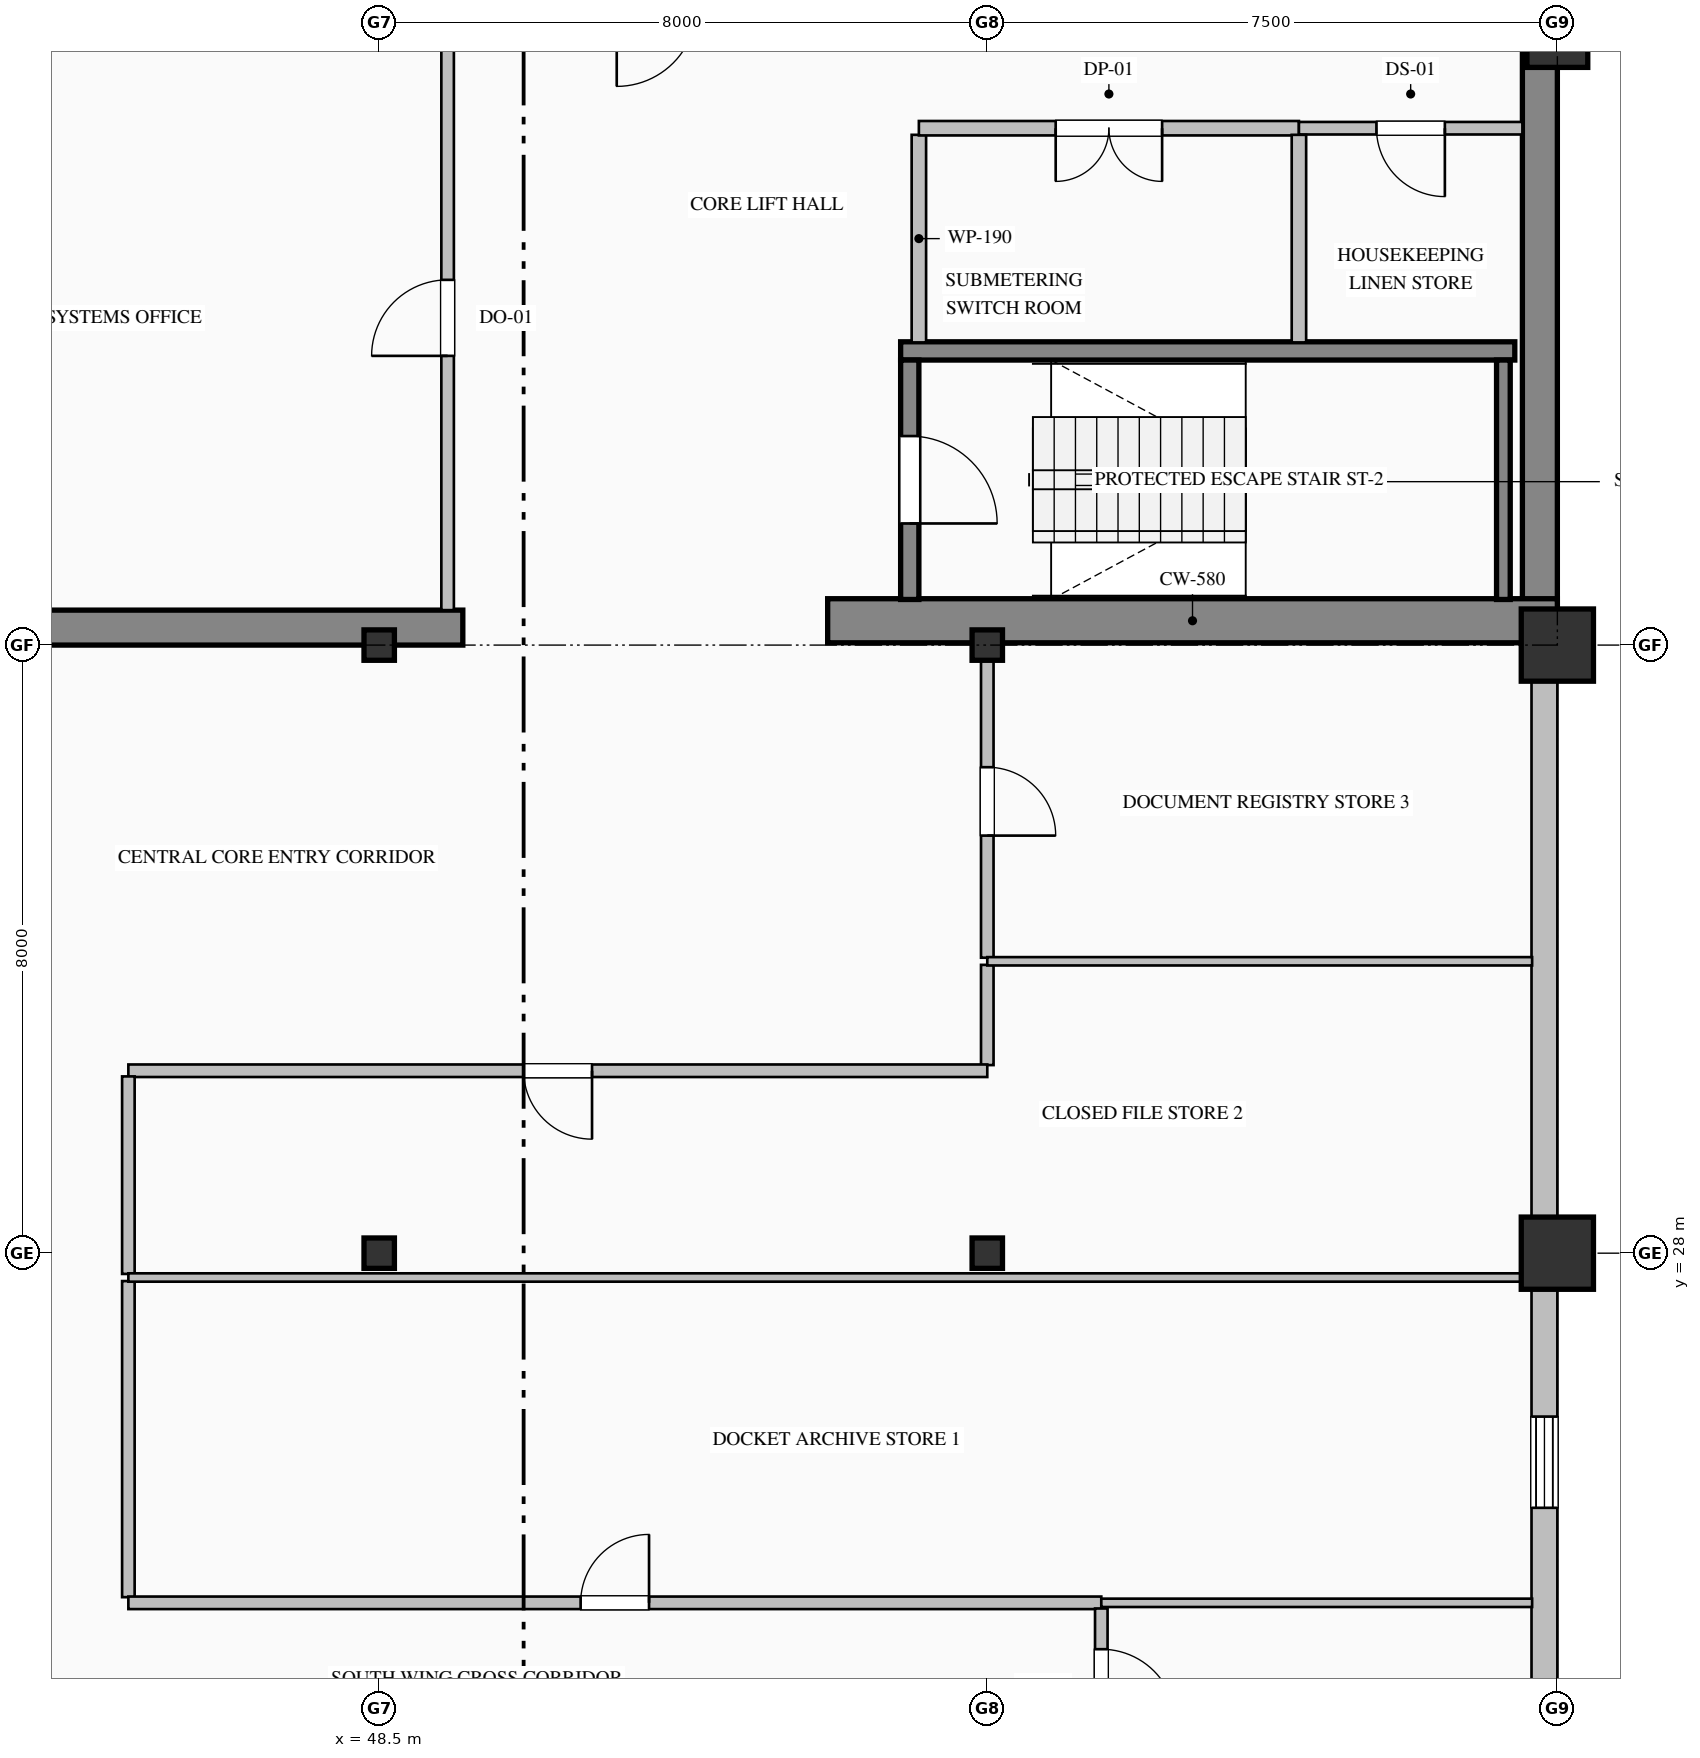
"""IFC4 building model, lengths in metres.
Left out: names, types, materials, properties, quantities, classifications, styles, units other than length and angle.
Written with IfcOpenShell. Run it as: python <this file> out.ifc"""

import sys

from ifc_helpers import new_model, si_unit, direction, frame, frame_2d, origin, origin_2d, place, context, subcontext, project, spatial, rectangle, hollow_rectangle, i_section, extrude, element, fill, save


model = new_model("IFC4")
c1 = context("Model", 3, precision=1e-05, world=origin(), true_north=direction((0.0, 1.0)))
c2 = subcontext(c1, "Body", "Model", "MODEL_VIEW")
j1 = project(units=[si_unit("LENGTHUNIT", "METRE"), si_unit("PLANEANGLEUNIT", "RADIAN")], contexts=[c1])
p1 = place(None, origin())
s1 = spatial("IfcSite", under=j1, at=p1, CompositionType="ELEMENT")
p2 = place(p1, origin())
s2 = spatial("IfcBuilding", under=s1, at=p2, CompositionType="ELEMENT")
p3 = place(p2, frame((0.0, 0.0, 277.8)))
s3 = spatial("IfcBuildingStorey", under=s2, at=p3, CompositionType="ELEMENT", Elevation=277.8)
p4 = place(p3, frame((63.77, 36.32, 0.0), z_axis=(0.0, 0.0, 1.0), x_axis=(0.0, 1.0, 0.0)))
e1 = element("IfcWall", 1, at=p4, inside=s3, PredefinedType="SHEAR", context=c2, shape_type="SweptSolid", body=[
    extrude(rectangle(XDim=15.22, YDim=0.46, at=frame_2d((7.61, 0.0))), origin(), (0.0, 0.0, 1.0), 3.65),
])
p5 = place(p3, frame((40.5, 36.23, 0.0), z_axis=(0.0, 0.0, 1.0), x_axis=(1.0, 0.0, 0.0)))
e2 = element("IfcWall", 2, at=p5, inside=s3, PredefinedType="SHEAR", context=c2, shape_type="SweptSolid", body=[
    extrude(rectangle(XDim=9.1, YDim=0.46, at=frame_2d((4.55, 0.0))), origin(), (0.0, 0.0, 1.0), 3.65),
])
p6 = place(p3, frame((54.4, 36.32, 0.0), z_axis=(0.0, 0.0, 1.0), x_axis=(1.0, 0.0, 0.0)))
e3 = element("IfcWall", 3, at=p6, inside=s3, PredefinedType="SHEAR", context=c2, shape_type="SweptSolid", body=[
    extrude(rectangle(XDim=9.6, YDim=0.58, at=frame_2d((4.8, 0.0))), origin(), (0.0, 0.0, 1.0), 4.0),
])
for number, where, z_axis, x_axis in (
    (4, (48.5, 28.0, 0.0), (0.0, 0.0, 1.0), (1.0, 0.0, 0.0)),
    (5, (48.5, 36.0, 0.0), (0.0, 0.0, 1.0), (1.0, 0.0, 0.0)),
    (6, (56.5, 28.0, 0.0), (0.0, 0.0, 1.0), (1.0, 0.0, 0.0)),
    (7, (56.5, 36.0, 0.0), (0.0, 0.0, 1.0), (1.0, 0.0, 0.0)),
):
    element("IfcColumn", number, at=place(p3, frame(where, z_axis=z_axis, x_axis=x_axis)), inside=s3, PredefinedType="COLUMN", context=c2, shape_type="SweptSolid", body=[
        extrude(i_section(OverallWidth=0.4, OverallDepth=0.4, WebThickness=0.013, FlangeThickness=0.021, FilletRadius=0.022, at=origin_2d()), origin(), (0.0, 0.0, 1.0), 4.0),
    ])
for number, where, z_axis, x_axis in (
    (8, (64.0, 28.0, 0.0), (0.0, 0.0, 1.0), (1.0, 0.0, 0.0)),
    (9, (64.0, 36.0, 0.0), (0.0, 0.0, 1.0), (1.0, 0.0, 0.0)),
):
    element("IfcColumn", number, at=place(p3, frame(where, z_axis=z_axis, x_axis=x_axis)), inside=s3, PredefinedType="COLUMN", context=c2, shape_type="SweptSolid", body=[
        extrude(hollow_rectangle(XDim=0.95, YDim=0.95, WallThickness=0.036, at=origin_2d()), origin(), (0.0, 0.0, 1.0), 4.0),
    ])
p7 = place(p3, frame((64.0, 44.0, 0.0), z_axis=(0.0, 0.0, 1.0), x_axis=(1.0, 0.0, 0.0)))
e10 = element("IfcColumn", 10, at=p7, inside=s3, PredefinedType="COLUMN", context=c2, shape_type="SweptSolid", body=[
    extrude(hollow_rectangle(XDim=0.8, YDim=0.8, WallThickness=0.032, at=origin_2d()), origin(), (0.0, 0.0, 1.0), 4.0),
])
p8 = place(p3, frame((63.83, 36.05, 0.0), z_axis=(0.0, 0.0, 1.0), x_axis=(0.0, -1.0, 0.0)))
e11 = element("IfcWall", 11, at=p8, inside=s3, PredefinedType="SOLIDWALL", context=c2, shape_type="SweptSolid", body=[
    extrude(rectangle(XDim=19.55, YDim=0.34, at=frame_2d((9.775, 0.0))), origin(), (0.0, 0.0, 1.0), 3.2),
])
p9 = place(p8, frame((10.2, 0.0, 0.9)))
e12 = element("IfcOpeningElement", 12, at=p9, cuts=e11, PredefinedType="OPENING", context=c2, shape_type="SweptSolid", body=[
    extrude(rectangle(XDim=1.2, YDim=1.85, at=frame_2d((0.6, 0.925))), frame((0.0, 0.18, 0.0), z_axis=(0.0, -1.0, 0.0), x_axis=(1.0, 0.0, 0.0)), (0.0, 0.0, 1.0), 0.36),
])
p10 = place(p8, frame((13.725, 0.0, 0.9)))
e13 = element("IfcOpeningElement", 13, at=p10, cuts=e11, PredefinedType="OPENING", context=c2, shape_type="SweptSolid", body=[
    extrude(rectangle(XDim=1.35, YDim=1.85, at=frame_2d((0.675, 0.925))), frame((0.0, 0.18, 0.0), z_axis=(0.0, -1.0, 0.0), x_axis=(1.0, 0.0, 0.0)), (0.0, 0.0, 1.0), 0.36),
])
p11 = place(p3, frame((55.36, 39.87, 0.0), z_axis=(0.0, 0.0, 1.0), x_axis=(1.0, 0.0, 0.0)))
e14 = element("IfcWall", 14, at=p11, inside=s3, PredefinedType="SOLIDWALL", context=c2, shape_type="SweptSolid", body=[
    extrude(rectangle(XDim=8.08, YDim=0.24, at=frame_2d((4.04, 0.0))), origin(), (0.0, 0.0, 1.0), 4.0),
])
p12 = place(p3, frame((55.48, 39.75, 0.0), z_axis=(0.0, 0.0, 1.0), x_axis=(0.0, -1.0, 0.0)))
e15 = element("IfcWall", 15, at=p12, inside=s3, PredefinedType="SOLIDWALL", context=c2, shape_type="SweptSolid", body=[
    extrude(rectangle(XDim=3.15, YDim=0.24, at=frame_2d((1.575, 0.0))), origin(), (0.0, 0.0, 1.0), 4.0),
])
p13 = place(p12, frame((1.0, 0.0, 0.0)))
e16 = element("IfcOpeningElement", 16, at=p13, cuts=e15, PredefinedType="OPENING", context=c2, shape_type="SweptSolid", body=[
    extrude(rectangle(XDim=1.15, YDim=2.2, at=frame_2d((0.575, 1.1))), frame((0.0, 0.13, 0.0), z_axis=(0.0, -1.0, 0.0), x_axis=(1.0, 0.0, 0.0)), (0.0, 0.0, 1.0), 0.26),
])
p14 = place(p3, frame((63.29, 36.6, 0.0), z_axis=(0.0, 0.0, 1.0), x_axis=(0.0, 1.0, 0.0)))
e17 = element("IfcWall", 17, at=p14, inside=s3, PredefinedType="SOLIDWALL", context=c2, shape_type="SweptSolid", body=[
    extrude(rectangle(XDim=3.15, YDim=0.18, at=frame_2d((1.575, 0.0))), origin(), (0.0, 0.0, 1.0), 4.0),
])
p15 = place(p3, frame((49.4, 36.46, 0.0), z_axis=(0.0, 0.0, 1.0), x_axis=(0.0, 1.0, 0.0)))
e18 = element("IfcWall", 18, at=p15, inside=s3, PredefinedType="PARTITIONING", context=c2, shape_type="SweptSolid", body=[
    extrude(rectangle(XDim=7.69, YDim=0.165, at=frame_2d((3.845, 0.0))), origin(), (0.0, 0.0, 1.0), 2.892),
])
p16 = place(p15, frame((3.345, 0.0, 0.0)))
e19 = element("IfcOpeningElement", 19, at=p16, cuts=e18, PredefinedType="OPENING", context=c2, shape_type="SweptSolid", body=[
    extrude(rectangle(XDim=1.0, YDim=2.15, at=frame_2d((0.5, 1.075))), frame((0.0, 0.093, 0.0), z_axis=(0.0, -1.0, 0.0), x_axis=(1.0, 0.0, 0.0)), (0.0, 0.0, 1.0), 0.185),
])
p17 = place(p3, frame((55.6, 42.713, 0.0), z_axis=(0.0, 0.0, 1.0), x_axis=(0.0, -1.0, 0.0)))
e20 = element("IfcWall", 20, at=p17, inside=s3, PredefinedType="PARTITIONING", context=c2, shape_type="SweptSolid", body=[
    extrude(rectangle(XDim=2.731, YDim=0.19, at=frame_2d((1.365, 0.0))), origin(), (0.0, 0.0, 1.0), 3.65),
])
p18 = place(p3, frame((60.6, 42.8, 0.0), z_axis=(0.0, 0.0, 1.0), x_axis=(-1.0, 0.0, 0.0)))
e21 = element("IfcWall", 21, at=p18, inside=s3, PredefinedType="PARTITIONING", context=c2, shape_type="SweptSolid", body=[
    extrude(rectangle(XDim=5.0, YDim=0.19, at=frame_2d((2.5, 0.0))), origin(), (0.0, 0.0, 1.0), 3.65),
])
p19 = place(p18, frame((1.8, 0.0, 0.0)))
e22 = element("IfcOpeningElement", 22, at=p19, cuts=e21, PredefinedType="OPENING", context=c2, shape_type="SweptSolid", body=[
    extrude(rectangle(XDim=1.4, YDim=2.25, at=frame_2d((0.7, 1.125))), frame((0.0, 0.105, 0.0), z_axis=(0.0, -1.0, 0.0), x_axis=(1.0, 0.0, 0.0)), (0.0, 0.0, 1.0), 0.21),
])
p20 = place(p3, frame((63.54, 42.8, 0.0), z_axis=(0.0, 0.0, 1.0), x_axis=(-1.0, 0.0, 0.0)))
e23 = element("IfcWall", 23, at=p20, inside=s3, PredefinedType="PARTITIONING", context=c2, shape_type="SweptSolid", body=[
    extrude(rectangle(XDim=2.94, YDim=0.165, at=frame_2d((1.47, 0.0))), origin(), (0.0, 0.0, 1.0), 3.65),
])
p21 = place(p20, frame((1.02, 0.0, 0.0)))
e24 = element("IfcOpeningElement", 24, at=p21, cuts=e23, PredefinedType="OPENING", context=c2, shape_type="SweptSolid", body=[
    extrude(rectangle(XDim=0.9, YDim=2.15, at=frame_2d((0.45, 1.075))), frame((0.0, 0.093, 0.0), z_axis=(0.0, -1.0, 0.0), x_axis=(1.0, 0.0, 0.0)), (0.0, 0.0, 1.0), 0.185),
])
p22 = place(p3, frame((60.6, 42.713, 0.0), z_axis=(0.0, 0.0, 1.0), x_axis=(0.0, -1.0, 0.0)))
e25 = element("IfcWall", 25, at=p22, inside=s3, PredefinedType="PARTITIONING", context=c2, shape_type="SweptSolid", body=[
    extrude(rectangle(XDim=2.731, YDim=0.19, at=frame_2d((1.365, 0.0))), origin(), (0.0, 0.0, 1.0), 3.65),
])
p23 = place(p3, frame((56.5, 31.793, 0.0), z_axis=(0.0, 0.0, 1.0), x_axis=(0.0, -1.0, 0.0)))
e26 = element("IfcWall", 26, at=p23, inside=s3, PredefinedType="PARTITIONING", context=c2, shape_type="SweptSolid", body=[
    extrude(rectangle(XDim=1.318, YDim=0.165, at=frame_2d((0.659, 0.0))), origin(), (0.0, 0.0, 1.0), 3.054),
])
p24 = place(p3, frame((56.5, 30.4, 0.0), z_axis=(0.0, 0.0, 1.0), x_axis=(-1.0, 0.0, 0.0)))
e27 = element("IfcWall", 27, at=p24, inside=s3, PredefinedType="PARTITIONING", context=c2, shape_type="SweptSolid", body=[
    extrude(rectangle(XDim=11.3, YDim=0.165, at=frame_2d((5.65, 0.0))), origin(), (0.0, 0.0, 1.0), 3.65),
])
p25 = place(p24, frame((5.2, 0.0, 0.0)))
e28 = element("IfcOpeningElement", 28, at=p25, cuts=e27, PredefinedType="OPENING", context=c2, shape_type="SweptSolid", body=[
    extrude(rectangle(XDim=0.9, YDim=2.15, at=frame_2d((0.45, 1.075))), frame((0.0, 0.093, 0.0), z_axis=(0.0, -1.0, 0.0), x_axis=(1.0, 0.0, 0.0)), (0.0, 0.0, 1.0), 0.185),
])
p26 = place(p3, frame((56.5, 36.0, 0.0), z_axis=(0.0, 0.0, 1.0), x_axis=(0.0, -1.0, 0.0)))
e29 = element("IfcWall", 29, at=p26, inside=s3, PredefinedType="PARTITIONING", context=c2, shape_type="SweptSolid", body=[
    extrude(rectangle(XDim=4.113, YDim=0.165, at=frame_2d((2.057, 0.0))), origin(), (0.0, 0.0, 1.0), 3.054),
])
p27 = place(p26, frame((1.606, 0.0, 0.0)))
e30 = element("IfcOpeningElement", 30, at=p27, cuts=e29, PredefinedType="OPENING", context=c2, shape_type="SweptSolid", body=[
    extrude(rectangle(XDim=0.9, YDim=2.15, at=frame_2d((0.45, 1.075))), frame((0.0, 0.093, 0.0), z_axis=(0.0, -1.0, 0.0), x_axis=(1.0, 0.0, 0.0)), (0.0, 0.0, 1.0), 0.185),
])
p28 = place(p3, frame((45.2, 27.633, 0.0), z_axis=(0.0, 0.0, 1.0), x_axis=(0.0, -1.0, 0.0)))
e31 = element("IfcWall", 31, at=p28, inside=s3, PredefinedType="PARTITIONING", context=c2, shape_type="SweptSolid", body=[
    extrude(rectangle(XDim=4.158, YDim=0.165, at=frame_2d((2.079, 0.0))), origin(), (0.0, 0.0, 1.0), 3.65),
])
p29 = place(p3, frame((45.2, 30.325, 0.0), z_axis=(0.0, 0.0, 1.0), x_axis=(0.0, -1.0, 0.0)))
e32 = element("IfcWall", 32, at=p29, inside=s3, PredefinedType="PARTITIONING", context=c2, shape_type="SweptSolid", body=[
    extrude(rectangle(XDim=2.598, YDim=0.165, at=frame_2d((1.299, 0.0))), origin(), (0.0, 0.0, 1.0), 3.65),
])
p30 = place(p3, frame((45.2, 23.4, 0.0), z_axis=(0.0, 0.0, 1.0), x_axis=(1.0, 0.0, 0.0)))
e33 = element("IfcWall", 33, at=p30, inside=s3, PredefinedType="PARTITIONING", context=c2, shape_type="SweptSolid", body=[
    extrude(rectangle(XDim=12.8, YDim=0.165, at=frame_2d((6.4, 0.0))), origin(), (0.0, 0.0, 1.0), 3.342),
])
p31 = place(p30, frame((5.95, 0.0, 0.0)))
e34 = element("IfcOpeningElement", 34, at=p31, cuts=e33, PredefinedType="OPENING", context=c2, shape_type="SweptSolid", body=[
    extrude(rectangle(XDim=0.9, YDim=2.15, at=frame_2d((0.45, 1.075))), frame((0.0, 0.093, 0.0), z_axis=(0.0, -1.0, 0.0), x_axis=(1.0, 0.0, 0.0)), (0.0, 0.0, 1.0), 0.185),
])
p32 = place(p3, frame((58.0, 23.325, 0.0), z_axis=(0.0, 0.0, 1.0), x_axis=(0.0, -1.0, 0.0)))
e35 = element("IfcWall", 35, at=p32, inside=s3, PredefinedType="PARTITIONING", context=c2, shape_type="SweptSolid", body=[
    extrude(rectangle(XDim=2.051, YDim=0.165, at=frame_2d((1.025, 0.0))), origin(), (0.0, 0.0, 1.0), 3.65),
])
p33 = place(p32, frame((0.535, 0.0, 0.0)))
e36 = element("IfcOpeningElement", 36, at=p33, cuts=e35, PredefinedType="OPENING", context=c2, shape_type="SweptSolid", body=[
    extrude(rectangle(XDim=0.98, YDim=2.25, at=frame_2d((0.49, 1.125))), frame((0.0, 0.093, 0.0), z_axis=(0.0, -1.0, 0.0), x_axis=(1.0, 0.0, 0.0)), (0.0, 0.0, 1.0), 0.185),
])
p34 = place(p3, frame((45.2, 27.68, 0.0), z_axis=(0.0, 0.0, 1.0), x_axis=(1.0, 0.0, 0.0)))
e37 = element("IfcWall", 37, at=p34, inside=s3, PredefinedType="MOVABLE", context=c2, shape_type="SweptSolid", body=[
    extrude(rectangle(XDim=18.468, YDim=0.11, at=frame_2d((9.234, 0.0))), origin(), (0.0, 0.0, 1.0), 3.65),
])
p35 = place(p3, frame((63.668, 23.4, 0.0), z_axis=(0.0, 0.0, 1.0), x_axis=(-1.0, 0.0, 0.0)))
e38 = element("IfcWall", 38, at=p35, inside=s3, PredefinedType="MOVABLE", context=c2, shape_type="SweptSolid", body=[
    extrude(rectangle(XDim=5.668, YDim=0.11, at=frame_2d((2.834, 0.0))), origin(), (0.0, 0.0, 1.0), 3.65),
])
p36 = place(p3, frame((56.5, 31.84, 0.0), z_axis=(0.0, 0.0, 1.0), x_axis=(1.0, 0.0, 0.0)))
e39 = element("IfcWall", 39, at=p36, inside=s3, PredefinedType="MOVABLE", context=c2, shape_type="SweptSolid", body=[
    extrude(rectangle(XDim=7.168, YDim=0.11, at=frame_2d((3.584, 0.0))), origin(), (0.0, 0.0, 1.0), 3.65),
])
p37 = place(p9, origin())
e40 = element("IfcWindow", 40, at=p37, inside=s3, PartitioningType="DOUBLE_PANEL_VERTICAL", PredefinedType="WINDOW", context=c2, shape_type="SweptSolid", body=[
    extrude(rectangle(XDim=1.2, YDim=1.85, at=frame_2d((0.6, 0.925))), frame((0.0, 0.15, 0.0), z_axis=(0.0, -1.0, 0.0), x_axis=(1.0, 0.0, 0.0)), (0.0, 0.0, 1.0), 0.06),
])
fill(e12, e40)
p38 = place(p13, origin())
e41 = element("IfcDoor", 41, at=p38, inside=s3, OperationType="SINGLE_SWING_RIGHT", PredefinedType="DOOR", context=c2, shape_type="SweptSolid", body=[
    extrude(rectangle(XDim=1.15, YDim=2.2, at=frame_2d((0.575, 1.1))), frame((0.0, 0.025, 0.0), z_axis=(0.0, -1.0, 0.0), x_axis=(1.0, 0.0, 0.0)), (0.0, 0.0, 1.0), 0.05),
])
fill(e16, e41)
p39 = place(p16, origin())
e42 = element("IfcDoor", 42, at=p39, inside=s3, OperationType="SINGLE_SWING_LEFT", PredefinedType="DOOR", context=c2, shape_type="SweptSolid", body=[
    extrude(rectangle(XDim=1.0, YDim=2.15, at=frame_2d((0.5, 1.075))), frame((0.0, 0.025, 0.0), z_axis=(0.0, -1.0, 0.0), x_axis=(1.0, 0.0, 0.0)), (0.0, 0.0, 1.0), 0.05),
])
fill(e19, e42)
p40 = place(p19, origin())
e43 = element("IfcDoor", 43, at=p40, inside=s3, OperationType="DOUBLE_DOOR_SINGLE_SWING", PredefinedType="DOOR", context=c2, shape_type="SweptSolid", body=[
    extrude(rectangle(XDim=1.4, YDim=2.25, at=frame_2d((0.7, 1.125))), frame((0.0, 0.025, 0.0), z_axis=(0.0, -1.0, 0.0), x_axis=(1.0, 0.0, 0.0)), (0.0, 0.0, 1.0), 0.05),
])
fill(e22, e43)
p41 = place(p21, origin())
e44 = element("IfcDoor", 44, at=p41, inside=s3, OperationType="SINGLE_SWING_LEFT", PredefinedType="DOOR", context=c2, shape_type="SweptSolid", body=[
    extrude(rectangle(XDim=0.9, YDim=2.15, at=frame_2d((0.45, 1.075))), frame((0.0, 0.025, 0.0), z_axis=(0.0, -1.0, 0.0), x_axis=(1.0, 0.0, 0.0)), (0.0, 0.0, 1.0), 0.05),
])
fill(e24, e44)
p42 = place(p31, origin())
e45 = element("IfcDoor", 45, at=p42, inside=s3, OperationType="SINGLE_SWING_RIGHT", PredefinedType="DOOR", context=c2, shape_type="SweptSolid", body=[
    extrude(rectangle(XDim=0.9, YDim=2.15, at=frame_2d((0.45, 1.075))), frame((0.0, 0.025, 0.0), z_axis=(0.0, -1.0, 0.0), x_axis=(1.0, 0.0, 0.0)), (0.0, 0.0, 1.0), 0.05),
])
fill(e34, e45)
p43 = place(p25, origin())
e46 = element("IfcDoor", 46, at=p43, inside=s3, OperationType="SINGLE_SWING_LEFT", PredefinedType="DOOR", context=c2, shape_type="SweptSolid", body=[
    extrude(rectangle(XDim=0.9, YDim=2.15, at=frame_2d((0.45, 1.075))), frame((0.0, 0.025, 0.0), z_axis=(0.0, -1.0, 0.0), x_axis=(1.0, 0.0, 0.0)), (0.0, 0.0, 1.0), 0.05),
])
fill(e28, e46)
p44 = place(p27, origin())
e47 = element("IfcDoor", 47, at=p44, inside=s3, OperationType="SINGLE_SWING_RIGHT", PredefinedType="DOOR", context=c2, shape_type="SweptSolid", body=[
    extrude(rectangle(XDim=0.9, YDim=2.15, at=frame_2d((0.45, 1.075))), frame((0.0, 0.025, 0.0), z_axis=(0.0, -1.0, 0.0), x_axis=(1.0, 0.0, 0.0)), (0.0, 0.0, 1.0), 0.05),
])
fill(e30, e47)
p45 = place(p33, origin())
e48 = element("IfcDoor", 48, at=p45, inside=s3, OperationType="SINGLE_SWING_RIGHT", PredefinedType="DOOR", context=c2, shape_type="SweptSolid", body=[
    extrude(rectangle(XDim=0.98, YDim=2.25, at=frame_2d((0.49, 1.125))), frame((0.0, 0.025, 0.0), z_axis=(0.0, -1.0, 0.0), x_axis=(1.0, 0.0, 0.0)), (0.0, 0.0, 1.0), 0.05),
])
fill(e36, e48)
save(model, sys.argv[1])
